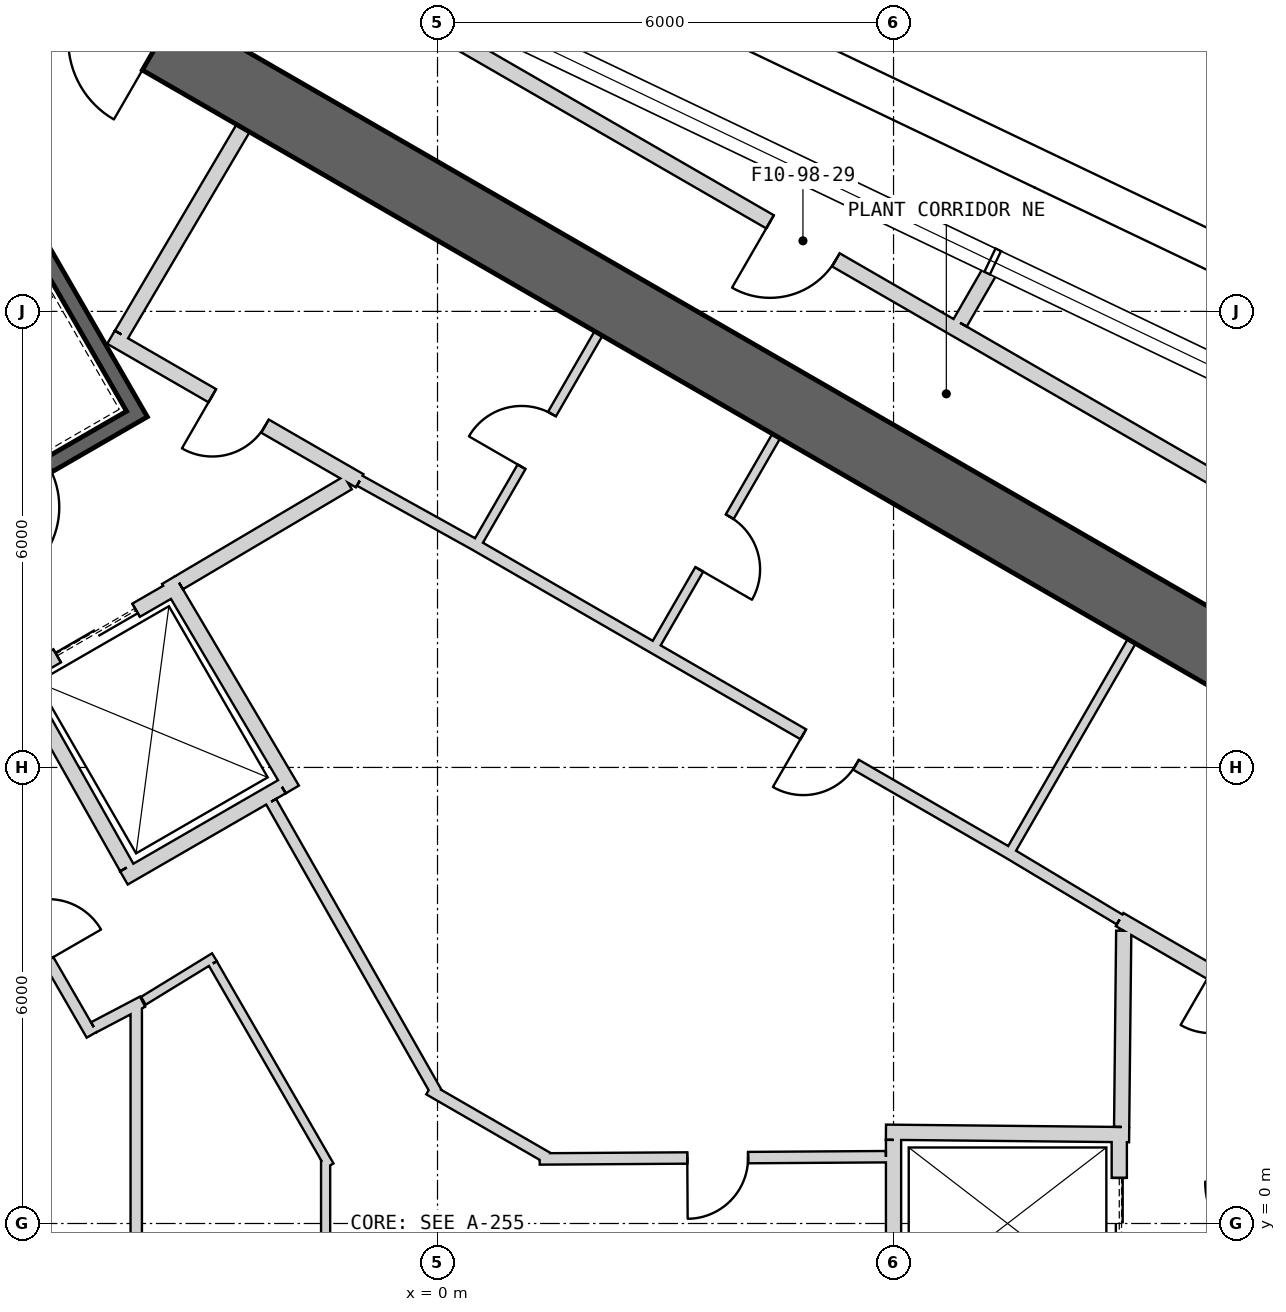
"""IFC4 building model, lengths in metres.
Left out: names, types, materials, properties, quantities, classifications, styles, units other than length and angle.
Written with IfcOpenShell. Run it as: python <this file> out.ifc"""

import sys

from ifc_helpers import new_model, si_unit, direction, frame, frame_2d, origin, place, context, subcontext, project, spatial, rectangle, extrude, element, fill, save


model = new_model("IFC4")
c1 = context("Model", 3, precision=1e-05, world=origin(), true_north=direction((0.0, 1.0)))
c2 = subcontext(c1, "Body", "Model", "MODEL_VIEW")
j1 = project(units=[si_unit("LENGTHUNIT", "METRE"), si_unit("PLANEANGLEUNIT", "RADIAN")], contexts=[c1])
p1 = place(None, origin())
s1 = spatial("IfcSite", under=j1, at=p1, CompositionType="ELEMENT")
p2 = place(p1, origin())
s2 = spatial("IfcBuilding", under=s1, at=p2, CompositionType="ELEMENT")
p3 = place(p2, frame((0.0, 0.0, 435.3)))
s3 = spatial("IfcBuildingStorey", under=s2, at=p3, CompositionType="ELEMENT", Elevation=435.3)
p4 = place(p3, frame((19.475, 2.208, 0.0), z_axis=(0.0, 0.0, 1.0), x_axis=(-0.866028369851, 0.499994862586, 0.0)))
e1 = element("IfcWall", 1, at=p4, inside=s3, PredefinedType="SHEAR", context=c2, shape_type="SweptSolid", body=[
    extrude(rectangle(XDim=31.523, YDim=0.9, at=frame_2d((15.762, 0.0))), origin(), (0.0, 0.0, 1.0), 5.0),
])
p5 = place(p4, frame((3.612, 0.0, 0.0)))
e2 = element("IfcOpeningElement", 2, at=p5, cuts=e1, PredefinedType="OPENING", context=c2, shape_type="SweptSolid", body=[
    extrude(rectangle(XDim=1.2, YDim=2.4, at=frame_2d((0.6, 1.2))), frame((0.0, 0.46, 0.0), z_axis=(0.0, -1.0, 0.0), x_axis=(1.0, 0.0, 0.0)), (0.0, 0.0, 1.0), 0.92),
])
p6 = place(p4, frame((26.712, 0.0, 0.0)))
e3 = element("IfcOpeningElement", 3, at=p6, cuts=e1, PredefinedType="OPENING", context=c2, shape_type="SweptSolid", body=[
    extrude(rectangle(XDim=1.2, YDim=2.4, at=frame_2d((0.6, 1.2))), frame((0.0, 0.46, 0.0), z_axis=(0.0, -1.0, 0.0), x_axis=(1.0, 0.0, 0.0)), (0.0, 0.0, 1.0), 0.92),
])
p7 = place(p3, frame((8.97, 1.2, 0.0), z_axis=(0.0, 0.0, 1.0), x_axis=(0.0, -1.0, 0.0)))
e4 = element("IfcWall", 4, at=p7, inside=s3, PredefinedType="PLUMBINGWALL", context=c2, shape_type="SweptSolid", body=[
    extrude(rectangle(XDim=2.4, YDim=0.2, at=frame_2d((1.2, 0.0))), origin(), (0.0, 0.0, 1.0), 4.75),
])
p8 = place(p7, frame((0.6, 0.0, 0.0)))
e5 = element("IfcOpeningElement", 5, at=p8, cuts=e4, PredefinedType="OPENING", context=c2, shape_type="SweptSolid", body=[
    extrude(rectangle(XDim=1.2, YDim=2.4, at=frame_2d((0.6, 1.2))), frame((0.0, 0.11, 0.0), z_axis=(0.0, -1.0, 0.0), x_axis=(1.0, 0.0, 0.0)), (0.0, 0.0, 1.0), 0.22),
])
p9 = place(p3, frame((6.0, -1.1, 0.0), z_axis=(0.0, 0.0, 1.0), x_axis=(0.0, 1.0, 0.0)))
e6 = element("IfcWall", 6, at=p9, inside=s3, PredefinedType="PLUMBINGWALL", context=c2, shape_type="SweptSolid", body=[
    extrude(rectangle(XDim=2.2, YDim=0.2, at=frame_2d((1.1, 0.0))), origin(), (0.0, 0.0, 1.0), 4.75),
])
p10 = place(p3, frame((5.9, 1.201, 0.0), z_axis=(0.0, 0.0, 1.0), x_axis=(0.999950064753, -0.009993397809, 0.0)))
e7 = element("IfcWall", 7, at=p10, inside=s3, PredefinedType="PLUMBINGWALL", context=c2, shape_type="SweptSolid", body=[
    extrude(rectangle(XDim=3.2, YDim=0.2, at=frame_2d((1.6, 0.0))), origin(), (0.0, 0.0, 1.0), 4.75),
])
p11 = place(p3, frame((-7.854, 17.405, -0.25), z_axis=(0.0, 0.0, 1.0), x_axis=(0.499997992926, -0.866026562566, 0.0)))
e8 = element("IfcWall", 8, at=p11, inside=s3, PredefinedType="SHEAR", context=c2, shape_type="SweptSolid", body=[
    extrude(rectangle(XDim=7.9, YDim=0.2, at=frame_2d((3.95, 0.0))), origin(), (0.0, 0.0, 1.0), 5.0),
])
p12 = place(p3, frame((-7.159, 8.8, -0.25), z_axis=(0.0, 0.0, 1.0), x_axis=(0.866047807691, 0.499961193289, 0.0)))
e9 = element("IfcWall", 9, at=p12, inside=s3, PredefinedType="SHEAR", context=c2, shape_type="SweptSolid", body=[
    extrude(rectangle(XDim=3.6, YDim=0.2, at=frame_2d((1.8, 0.0))), origin(), (0.0, 0.0, 1.0), 5.0),
])
p13 = place(p12, frame((1.25, 0.0, 0.25)))
e10 = element("IfcOpeningElement", 10, at=p13, cuts=e9, PredefinedType="OPENING", context=c2, shape_type="SweptSolid", body=[
    extrude(rectangle(XDim=1.1, YDim=2.1, at=frame_2d((0.55, 1.05))), frame((0.0, 0.11, 0.0), z_axis=(0.0, -1.0, 0.0), x_axis=(1.0, 0.0, 0.0)), (0.0, 0.0, 1.0), 0.22),
])
p14 = place(p3, frame((-5.524, 7.168, 0.0), z_axis=(0.0, 0.0, 1.0), x_axis=(0.866024647952, 0.500001309137, 0.0)))
e11 = element("IfcWall", 11, at=p14, inside=s3, PredefinedType="PLUMBINGWALL", context=c2, shape_type="SweptSolid", body=[
    extrude(rectangle(XDim=2.4, YDim=0.2, at=frame_2d((1.2, 0.0))), origin(), (0.0, 0.0, 1.0), 4.75),
])
p15 = place(p14, frame((0.6, 0.0, 0.0)))
e12 = element("IfcOpeningElement", 12, at=p15, cuts=e11, PredefinedType="OPENING", context=c2, shape_type="SweptSolid", body=[
    extrude(rectangle(XDim=1.2, YDim=2.4, at=frame_2d((0.6, 1.2))), frame((0.0, 0.11, 0.0), z_axis=(0.0, -1.0, 0.0), x_axis=(1.0, 0.0, 0.0)), (0.0, 0.0, 1.0), 0.22),
])
p16 = place(p3, frame((-3.538, 8.465, 0.0), z_axis=(0.0, 0.0, 1.0), x_axis=(0.508616218331, -0.860993346345, 0.0)))
e13 = element("IfcWall", 13, at=p16, inside=s3, PredefinedType="PLUMBINGWALL", context=c2, shape_type="SweptSolid", body=[
    extrude(rectangle(XDim=3.2, YDim=0.2, at=frame_2d((1.6, 0.0))), origin(), (0.0, 0.0, 1.0), 4.75),
])
p17 = place(p3, frame((-2.047, 5.746, 0.0), z_axis=(0.0, 0.0, 1.0), x_axis=(-0.866024647952, -0.500001309137, 0.0)))
e14 = element("IfcWall", 14, at=p17, inside=s3, PredefinedType="PLUMBINGWALL", context=c2, shape_type="SweptSolid", body=[
    extrude(rectangle(XDim=2.4, YDim=0.2, at=frame_2d((1.2, 0.0))), origin(), (0.0, 0.0, 1.0), 4.75),
])
p18 = place(p3, frame((-5.562, 7.296, 0.0), z_axis=(0.0, 0.0, 1.0), x_axis=(0.49134651263, -0.870964180966, 0.0)))
e15 = element("IfcWall", 15, at=p18, inside=s3, PredefinedType="PLUMBINGWALL", context=c2, shape_type="SweptSolid", body=[
    extrude(rectangle(XDim=3.0, YDim=0.2, at=frame_2d((1.5, 0.0))), origin(), (0.0, 0.0, 1.0), 4.75),
])
p19 = place(p3, frame((9.133, 7.659, 0.0), z_axis=(0.0, 0.0, 1.0), x_axis=(-0.500017246033, -0.866015446554, 0.0)))
e16 = element("IfcWall", 16, at=p19, inside=s3, PredefinedType="PARTITIONING", context=c2, shape_type="SweptSolid", body=[
    extrude(rectangle(XDim=3.25, YDim=0.12, at=frame_2d((1.625, 0.0))), origin(), (0.0, 0.0, 1.0), 4.75),
])
p20 = place(p3, frame((-4.296, 11.66, 0.0), z_axis=(0.0, 0.0, 1.0), x_axis=(0.866027389382, -0.499996560828, 0.0)))
e17 = element("IfcWall", 17, at=p20, inside=s3, PredefinedType="PARTITIONING", context=c2, shape_type="SweptSolid", body=[
    extrude(rectangle(XDim=3.778, YDim=0.2, at=frame_2d((1.889, 0.0))), origin(), (0.0, 0.0, 1.0), 4.75),
])
p21 = place(p20, frame((1.539, 0.0, 0.0)))
e18 = element("IfcOpeningElement", 18, at=p21, cuts=e17, PredefinedType="OPENING", context=c2, shape_type="SweptSolid", body=[
    extrude(rectangle(XDim=0.8, YDim=2.1, at=frame_2d((0.4, 1.05))), frame((0.0, 0.11, 0.0), z_axis=(0.0, -1.0, 0.0), x_axis=(1.0, 0.0, 0.0)), (0.0, 0.0, 1.0), 0.22),
])
p22 = place(p3, frame((8.974, 3.999, 0.0), z_axis=(0.0, 0.0, 1.0), x_axis=(0.86601284211, -0.500021756827, 0.0)))
e19 = element("IfcWall", 19, at=p22, inside=s3, PredefinedType="PARTITIONING", context=c2, shape_type="SweptSolid", body=[
    extrude(rectangle(XDim=3.577, YDim=0.2, at=frame_2d((1.789, 0.0))), origin(), (0.0, 0.0, 1.0), 4.75),
])
p23 = place(p22, frame((1.389, 0.0, 0.0)))
e20 = element("IfcOpeningElement", 20, at=p23, cuts=e19, PredefinedType="OPENING", context=c2, shape_type="SweptSolid", body=[
    extrude(rectangle(XDim=0.8, YDim=2.1, at=frame_2d((0.4, 1.05))), frame((0.0, 0.11, 0.0), z_axis=(0.0, -1.0, 0.0), x_axis=(1.0, 0.0, 0.0)), (0.0, 0.0, 1.0), 0.22),
])
p24 = place(p3, frame((8.975, 4.0, 0.0), z_axis=(0.0, 0.0, 1.0), x_axis=(-0.857530436795, 0.514433231791, 0.0)))
e21 = element("IfcWall", 21, at=p24, inside=s3, PredefinedType="PLUMBINGWALL", context=c2, shape_type="SweptSolid", body=[
    extrude(rectangle(XDim=1.723, YDim=0.15, at=frame_2d((0.861, 0.0))), origin(), (0.0, 0.0, 1.0), 4.75),
])
p25 = place(p3, frame((4.457, 10.359, 0.0), z_axis=(0.0, 0.0, 1.0), x_axis=(-0.500017246033, -0.866015446554, 0.0)))
e22 = element("IfcWall", 22, at=p25, inside=s3, PredefinedType="PARTITIONING", context=c2, shape_type="SweptSolid", body=[
    extrude(rectangle(XDim=3.25, YDim=0.12, at=frame_2d((1.625, 0.0))), origin(), (0.0, 0.0, 1.0), 4.75),
])
p26 = place(p25, frame((1.225, 0.0, 0.0)))
e23 = element("IfcOpeningElement", 23, at=p26, cuts=e22, PredefinedType="OPENING", context=c2, shape_type="SweptSolid", body=[
    extrude(rectangle(XDim=0.8, YDim=2.1, at=frame_2d((0.4, 1.05))), frame((0.0, 0.07, 0.0), z_axis=(0.0, -1.0, 0.0), x_axis=(1.0, 0.0, 0.0)), (0.0, 0.0, 1.0), 0.14),
])
p27 = place(p3, frame((7.497, 4.886, 0.0), z_axis=(0.0, 0.0, 1.0), x_axis=(-0.866030989016, 0.499990325971, 0.0)))
e24 = element("IfcWall", 24, at=p27, inside=s3, PredefinedType="PLUMBINGWALL", context=c2, shape_type="SweptSolid", body=[
    extrude(rectangle(XDim=8.1, YDim=0.15, at=frame_2d((4.05, 0.0))), origin(), (0.0, 0.0, 1.0), 4.75),
])
p28 = place(p27, frame((2.3, 0.0, 0.0)))
e25 = element("IfcOpeningElement", 25, at=p28, cuts=e24, PredefinedType="OPENING", context=c2, shape_type="SweptSolid", body=[
    extrude(rectangle(XDim=0.8, YDim=2.1, at=frame_2d((0.4, 1.05))), frame((0.0, 0.085, 0.0), z_axis=(0.0, -1.0, 0.0), x_axis=(1.0, 0.0, 0.0)), (0.0, 0.0, 1.0), 0.17),
])
p29 = place(p3, frame((0.494, 8.895, 0.0), z_axis=(0.0, 0.0, 1.0), x_axis=(0.500017246033, 0.866015446554, 0.0)))
e26 = element("IfcWall", 26, at=p29, inside=s3, PredefinedType="PARTITIONING", context=c2, shape_type="SweptSolid", body=[
    extrude(rectangle(XDim=3.25, YDim=0.12, at=frame_2d((1.625, 0.0))), origin(), (0.0, 0.0, 1.0), 4.75),
])
p30 = place(p29, frame((1.225, 0.0, 0.0)))
e27 = element("IfcOpeningElement", 27, at=p30, cuts=e26, PredefinedType="OPENING", context=c2, shape_type="SweptSolid", body=[
    extrude(rectangle(XDim=0.8, YDim=2.1, at=frame_2d((0.4, 1.05))), frame((0.0, 0.07, 0.0), z_axis=(0.0, -1.0, 0.0), x_axis=(1.0, 0.0, 0.0)), (0.0, 0.0, 1.0), 0.14),
])
p31 = place(p3, frame((-2.558, 14.409, 0.0), z_axis=(0.0, 0.0, 1.0), x_axis=(-0.508018930956, -0.861345903683, 0.0)))
e28 = element("IfcWall", 28, at=p31, inside=s3, PredefinedType="PARTITIONING", context=c2, shape_type="SweptSolid", body=[
    extrude(rectangle(XDim=3.15, YDim=0.2, at=frame_2d((1.575, 0.0))), origin(), (0.0, 0.0, 1.0), 4.75),
])
p32 = place(p3, frame((0.483, 8.936, 0.0), z_axis=(0.0, 0.0, 1.0), x_axis=(-0.874290944206, 0.485402250592, 0.0)))
e29 = element("IfcWall", 29, at=p32, inside=s3, PredefinedType="PLUMBINGWALL", context=c2, shape_type="SweptSolid", body=[
    extrude(rectangle(XDim=1.723, YDim=0.15, at=frame_2d((0.861, 0.0))), origin(), (0.0, 0.0, 1.0), 4.75),
])
for number, where, z_axis, x_axis in (
    (30, (9.001, 1.27, 0.0), (0.0, 0.0, 1.0), (0.011, 1.0, 0.0)),
    (31, (-1.179, 9.745, 0.0), (0.0, 0.0, 1.0), (-0.861, -0.509, 0.0)),
):
    element("IfcWall", number, at=place(p3, frame(where, z_axis=z_axis, x_axis=x_axis)), inside=s3, PredefinedType="PARTITIONING", context=c2, shape_type="SweptSolid", body=[
        extrude(rectangle(XDim=2.582, YDim=0.2, at=frame_2d((1.291, 0.0))), origin(), (0.0, 0.0, 1.0), 4.75),
    ])
p33 = place(p3, frame((1.344, 0.849, 0.0), z_axis=(0.0, 0.0, 1.0), x_axis=(0.999978627641, 0.00653790957, 0.0)))
e32 = element("IfcWall", 32, at=p33, inside=s3, PredefinedType="PLUMBINGWALL", context=c2, shape_type="SweptSolid", body=[
    extrude(rectangle(XDim=4.556, YDim=0.15, at=frame_2d((2.278, 0.0))), origin(), (0.0, 0.0, 1.0), 4.75),
])
p34 = place(p33, frame((1.942, 0.0, 0.0)))
e33 = element("IfcOpeningElement", 33, at=p34, cuts=e32, PredefinedType="OPENING", context=c2, shape_type="SweptSolid", body=[
    extrude(rectangle(XDim=0.8, YDim=2.1, at=frame_2d((0.4, 1.05))), frame((0.0, 0.085, 0.0), z_axis=(0.0, -1.0, 0.0), x_axis=(1.0, 0.0, 0.0)), (0.0, 0.0, 1.0), 0.17),
])
p35 = place(p3, frame((-0.111, 1.764, 0.0), z_axis=(0.0, 0.0, 1.0), x_axis=(0.866061671171, -0.499937177781, 0.0)))
e34 = element("IfcWall", 34, at=p35, inside=s3, PredefinedType="PLUMBINGWALL", context=c2, shape_type="SweptSolid", body=[
    extrude(rectangle(XDim=1.804, YDim=0.15, at=frame_2d((0.902, 0.0))), origin(), (0.0, 0.0, 1.0), 4.75),
])
p36 = place(p3, frame((-2.189, 5.549, 0.0), z_axis=(0.0, 0.0, 1.0), x_axis=(0.494335077001, -0.869271437266, 0.0)))
e35 = element("IfcWall", 35, at=p36, inside=s3, PredefinedType="PLUMBINGWALL", context=c2, shape_type="SweptSolid", body=[
    extrude(rectangle(XDim=4.404, YDim=0.15, at=frame_2d((2.202, 0.0))), origin(), (0.0, 0.0, 1.0), 4.75),
])
p37 = place(p3, frame((-3.964, -2.908, 0.0), z_axis=(0.0, 0.0, 1.0), x_axis=(0.0, 1.0, 0.0)))
e36 = element("IfcWall", 36, at=p37, inside=s3, PredefinedType="PLUMBINGWALL", context=c2, shape_type="SweptSolid", body=[
    extrude(rectangle(XDim=5.815, YDim=0.15, at=frame_2d((2.908, 0.0))), origin(), (0.0, 0.0, 1.0), 4.75),
])
p38 = place(p3, frame((-4.551, 2.482, 0.0), z_axis=(0.0, 0.0, 1.0), x_axis=(-0.499990139034, 0.866031096941, 0.0)))
e37 = element("IfcWall", 37, at=p38, inside=s3, PredefinedType="PLUMBINGWALL", context=c2, shape_type="SweptSolid", body=[
    extrude(rectangle(XDim=3.0, YDim=0.15, at=frame_2d((1.5, 0.0))), origin(), (0.0, 0.0, 1.0), 4.75),
])
p39 = place(p38, frame((1.137, 0.0, 0.0)))
e38 = element("IfcOpeningElement", 38, at=p39, cuts=e37, PredefinedType="OPENING", context=c2, shape_type="SweptSolid", body=[
    extrude(rectangle(XDim=0.8, YDim=2.1, at=frame_2d((0.4, 1.05))), frame((0.0, 0.085, 0.0), z_axis=(0.0, -1.0, 0.0), x_axis=(1.0, 0.0, 0.0)), (0.0, 0.0, 1.0), 0.17),
])
p40 = place(p3, frame((-3.881, 2.919, 0.0), z_axis=(0.0, 0.0, 1.0), x_axis=(-0.885422176933, -0.464787659684, 0.0)))
e39 = element("IfcWall", 39, at=p40, inside=s3, PredefinedType="PLUMBINGWALL", context=c2, shape_type="SweptSolid", body=[
    extrude(rectangle(XDim=0.724, YDim=0.15, at=frame_2d((0.362, 0.0))), origin(), (0.0, 0.0, 1.0), 4.75),
])
p41 = place(p3, frame((-2.935, 3.503, 0.0), z_axis=(0.0, 0.0, 1.0), x_axis=(-0.852482838041, -0.522755211209, 0.0)))
e40 = element("IfcWall", 40, at=p41, inside=s3, PredefinedType="PARTITIONING", context=c2, shape_type="SweptSolid", body=[
    extrude(rectangle(XDim=1.097, YDim=0.12, at=frame_2d((0.548, 0.0))), origin(), (0.0, 0.0, 1.0), 4.75),
])
p42 = place(p3, frame((-1.42, 0.76, 0.0), z_axis=(0.0, 0.0, 1.0), x_axis=(-0.500011413361, 0.866018814177, 0.0)))
e41 = element("IfcWall", 41, at=p42, inside=s3, PredefinedType="PARTITIONING", context=c2, shape_type="SweptSolid", body=[
    extrude(rectangle(XDim=3.072, YDim=0.12, at=frame_2d((1.536, 0.0))), origin(), (0.0, 0.0, 1.0), 4.75),
])
p43 = place(p3, frame((-1.472, -0.954, 0.0), z_axis=(0.0, 0.0, 1.0), x_axis=(0.0, 1.0, 0.0)))
e42 = element("IfcWall", 42, at=p43, inside=s3, PredefinedType="PARTITIONING", context=c2, shape_type="SweptSolid", body=[
    extrude(rectangle(XDim=1.785, YDim=0.12, at=frame_2d((0.893, 0.0))), origin(), (0.0, 0.0, 1.0), 4.75),
])
p44 = place(p3, frame((20.834, 3.675, 0.0), z_axis=(0.0, 0.0, 1.0), x_axis=(-0.866028536494, 0.499994573949, 0.0)))
e43 = element("IfcWall", 43, at=p44, inside=s3, PredefinedType="PARTITIONING", context=c2, shape_type="SweptSolid", body=[
    extrude(rectangle(XDim=32.411, YDim=0.2, at=frame_2d((16.206, 0.0))), origin(), (0.0, 0.0, 1.0), 4.75),
])
p45 = place(p44, frame((7.7, 0.0, 0.0)))
e44 = element("IfcOpeningElement", 44, at=p45, cuts=e43, PredefinedType="OPENING", context=c2, shape_type="SweptSolid", body=[
    extrude(rectangle(XDim=1.0, YDim=2.1, at=frame_2d((0.5, 1.05))), frame((0.0, 0.11, 0.0), z_axis=(0.0, -1.0, 0.0), x_axis=(1.0, 0.0, 0.0)), (0.0, 0.0, 1.0), 0.22),
])
p46 = place(p44, frame((18.006, 0.0, 0.0)))
e45 = element("IfcOpeningElement", 45, at=p46, cuts=e43, PredefinedType="OPENING", context=c2, shape_type="SweptSolid", body=[
    extrude(rectangle(XDim=1.0, YDim=2.1, at=frame_2d((0.5, 1.05))), frame((0.0, 0.11, 0.0), z_axis=(0.0, -1.0, 0.0), x_axis=(1.0, 0.0, 0.0)), (0.0, 0.0, 1.0), 0.22),
])
p47 = place(p3, frame((7.271, 12.534, 0.0), z_axis=(0.0, 0.0, 1.0), x_axis=(-0.500025443912, -0.866010713236, 0.0)))
e46 = element("IfcWall", 46, at=p47, inside=s3, PredefinedType="PARTITIONING", context=c2, shape_type="SweptSolid", body=[
    extrude(rectangle(XDim=0.791, YDim=0.2, at=frame_2d((0.395, 0.0))), origin(), (0.0, 0.0, 1.0), 4.75),
])
p48 = place(p8, origin())
e47 = element("IfcDoor", 47, at=p48, inside=s3, OperationType="SLIDING_TO_LEFT", PredefinedType="USERDEFINED", context=c2, shape_type="SweptSolid", body=[
    extrude(rectangle(XDim=1.2, YDim=2.4, at=frame_2d((0.6, 1.2))), frame((0.0, 0.025, 0.0), z_axis=(0.0, -1.0, 0.0), x_axis=(1.0, 0.0, 0.0)), (0.0, 0.0, 1.0), 0.05),
])
fill(e5, e47)
p49 = place(p15, origin())
e48 = element("IfcDoor", 48, at=p49, inside=s3, OperationType="SLIDING_TO_LEFT", PredefinedType="USERDEFINED", context=c2, shape_type="SweptSolid", body=[
    extrude(rectangle(XDim=1.2, YDim=2.4, at=frame_2d((0.6, 1.2))), frame((0.0, 0.025, 0.0), z_axis=(0.0, -1.0, 0.0), x_axis=(1.0, 0.0, 0.0)), (0.0, 0.0, 1.0), 0.05),
])
fill(e12, e48)
p50 = place(p34, origin())
e49 = element("IfcDoor", 49, at=p50, inside=s3, OperationType="SINGLE_SWING_LEFT", PredefinedType="USERDEFINED", context=c2, shape_type="SweptSolid", body=[
    extrude(rectangle(XDim=0.8, YDim=2.1, at=frame_2d((0.4, 1.05))), frame((0.0, 0.025, 0.0), z_axis=(0.0, -1.0, 0.0), x_axis=(1.0, 0.0, 0.0)), (0.0, 0.0, 1.0), 0.05),
])
fill(e33, e49)
p51 = place(p26, origin())
e50 = element("IfcDoor", 50, at=p51, inside=s3, OperationType="SINGLE_SWING_RIGHT", PredefinedType="USERDEFINED", context=c2, shape_type="SweptSolid", body=[
    extrude(rectangle(XDim=0.8, YDim=2.1, at=frame_2d((0.4, 1.05))), frame((0.0, 0.025, 0.0), z_axis=(0.0, -1.0, 0.0), x_axis=(1.0, 0.0, 0.0)), (0.0, 0.0, 1.0), 0.05),
])
fill(e23, e50)
p52 = place(p21, origin())
e51 = element("IfcDoor", 51, at=p52, inside=s3, OperationType="SINGLE_SWING_LEFT", PredefinedType="USERDEFINED", context=c2, shape_type="SweptSolid", body=[
    extrude(rectangle(XDim=0.8, YDim=2.1, at=frame_2d((0.4, 1.05))), frame((0.0, 0.025, 0.0), z_axis=(0.0, -1.0, 0.0), x_axis=(1.0, 0.0, 0.0)), (0.0, 0.0, 1.0), 0.05),
])
fill(e18, e51)
p53 = place(p28, origin())
e52 = element("IfcDoor", 52, at=p53, inside=s3, OperationType="SINGLE_SWING_RIGHT", PredefinedType="USERDEFINED", context=c2, shape_type="SweptSolid", body=[
    extrude(rectangle(XDim=0.8, YDim=2.1, at=frame_2d((0.4, 1.05))), frame((0.0, 0.025, 0.0), z_axis=(0.0, -1.0, 0.0), x_axis=(1.0, 0.0, 0.0)), (0.0, 0.0, 1.0), 0.05),
])
fill(e25, e52)
p54 = place(p30, origin())
e53 = element("IfcDoor", 53, at=p54, inside=s3, OperationType="SINGLE_SWING_LEFT", PredefinedType="USERDEFINED", context=c2, shape_type="SweptSolid", body=[
    extrude(rectangle(XDim=0.8, YDim=2.1, at=frame_2d((0.4, 1.05))), frame((0.0, 0.025, 0.0), z_axis=(0.0, -1.0, 0.0), x_axis=(1.0, 0.0, 0.0)), (0.0, 0.0, 1.0), 0.05),
])
fill(e27, e53)
p55 = place(p46, origin())
e54 = element("IfcDoor", 54, at=p55, inside=s3, OperationType="SINGLE_SWING_RIGHT", PredefinedType="USERDEFINED", context=c2, shape_type="SweptSolid", body=[
    extrude(rectangle(XDim=1.0, YDim=2.1, at=frame_2d((0.5, 1.05))), frame((0.0, 0.025, 0.0), z_axis=(0.0, -1.0, 0.0), x_axis=(1.0, 0.0, 0.0)), (0.0, 0.0, 1.0), 0.05),
])
fill(e45, e54)
save(model, sys.argv[1])
